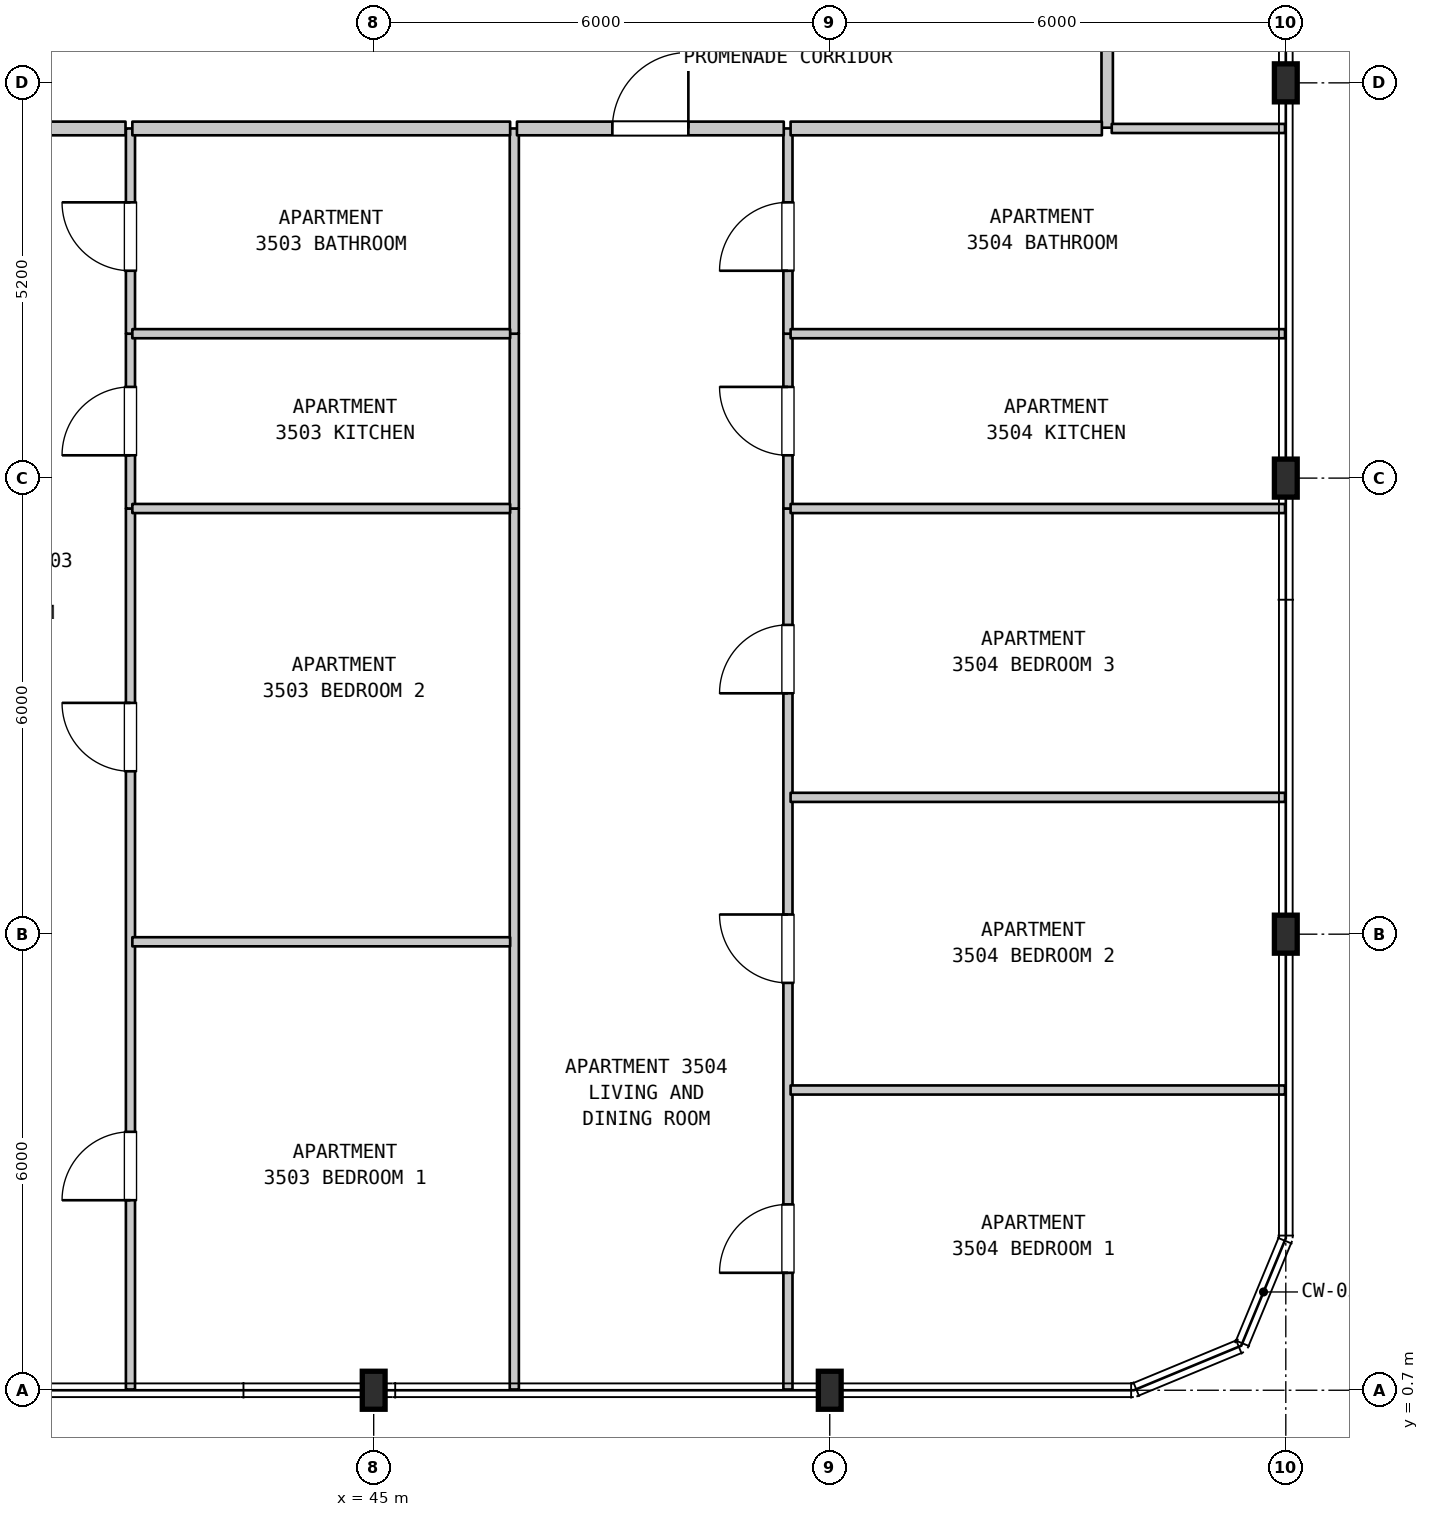
"""IFC4 building model, lengths in metres.
Left out: names, types, materials, properties, quantities, classifications, styles, units other than length and angle.
Written with IfcOpenShell. Run it as: python <this file> out.ifc"""

import sys

from ifc_helpers import new_model, si_unit, direction, frame, frame_2d, origin, origin_2d, place, context, subcontext, project, spatial, rectangle, i_section, extrude, element, fill, save


model = new_model("IFC4")
c1 = context("Model", 3, precision=1e-05, world=origin(), true_north=direction((0.0, 1.0)))
c2 = subcontext(c1, "Body", "Model", "MODEL_VIEW")
j1 = project(units=[si_unit("LENGTHUNIT", "METRE"), si_unit("PLANEANGLEUNIT", "RADIAN")], contexts=[c1])
p1 = place(None, origin())
s1 = spatial("IfcSite", under=j1, at=p1, CompositionType="ELEMENT")
p2 = place(p1, origin())
s2 = spatial("IfcBuilding", under=s1, at=p2, CompositionType="ELEMENT")
p3 = place(p2, frame((0.0, 0.0, 144.6)))
s3 = spatial("IfcBuildingStorey", under=s2, at=p3, CompositionType="ELEMENT", Elevation=144.6)
for number, where, z_axis, x_axis in (
    (1, (45.0, 0.7, 0.0), (0.0, 0.0, 1.0), (1.0, 0.0, 0.0)),
    (2, (51.0, 0.7, 0.0), (0.0, 0.0, 1.0), (1.0, 0.0, 0.0)),
    (3, (57.0, 6.7, 0.0), (0.0, 0.0, 1.0), (1.0, 0.0, 0.0)),
    (4, (57.0, 12.7, 0.0), (0.0, 0.0, 1.0), (1.0, 0.0, 0.0)),
    (5, (57.0, 17.9, 0.0), (0.0, 0.0, 1.0), (1.0, 0.0, 0.0)),
):
    element("IfcColumn", number, at=place(p3, frame(where, z_axis=z_axis, x_axis=x_axis)), inside=s3, PredefinedType="COLUMN", context=c2, shape_type="SweptSolid", body=[
        extrude(i_section(OverallWidth=0.3, OverallDepth=0.5, WebThickness=0.014, FlangeThickness=0.028, FilletRadius=0.027, at=origin_2d()), origin(), (0.0, 0.0, 1.0), 3.7),
    ])
p4 = place(p3, frame((41.8, 0.71, 0.0), z_axis=(0.0, 0.0, 1.0), x_axis=(0.0, 1.0, 0.0)))
e6 = element("IfcWall", 6, at=p4, inside=s3, PredefinedType="PARTITIONING", context=c2, shape_type="SweptSolid", body=[
    extrude(rectangle(XDim=11.59, YDim=0.12, at=frame_2d((5.795, 0.0))), origin(), (0.0, 0.0, 1.0), 3.385),
])
p5 = place(p4, frame((2.49, 0.0, 0.0)))
e7 = element("IfcOpeningElement", 7, at=p5, cuts=e6, PredefinedType="OPENING", context=c2, shape_type="SweptSolid", body=[
    extrude(rectangle(XDim=0.9, YDim=2.15, at=frame_2d((0.45, 1.075))), frame((0.0, 0.07, 0.0), z_axis=(0.0, -1.0, 0.0), x_axis=(1.0, 0.0, 0.0)), (0.0, 0.0, 1.0), 0.14),
])
p6 = place(p4, frame((8.133, 0.0, 0.0)))
e8 = element("IfcOpeningElement", 8, at=p6, cuts=e6, PredefinedType="OPENING", context=c2, shape_type="SweptSolid", body=[
    extrude(rectangle(XDim=0.9, YDim=2.15, at=frame_2d((0.45, 1.075))), frame((0.0, 0.07, 0.0), z_axis=(0.0, -1.0, 0.0), x_axis=(1.0, 0.0, 0.0)), (0.0, 0.0, 1.0), 0.14),
])
p7 = place(p3, frame((41.8, 12.3, 0.0), z_axis=(0.0, 0.0, 1.0), x_axis=(0.0, 1.0, 0.0)))
e9 = element("IfcWall", 9, at=p7, inside=s3, PredefinedType="PARTITIONING", context=c2, shape_type="SweptSolid", body=[
    extrude(rectangle(XDim=2.3, YDim=0.12, at=frame_2d((1.15, 0.0))), origin(), (0.0, 0.0, 1.0), 3.385),
])
p8 = place(p7, frame((0.7, 0.0, 0.0)))
e10 = element("IfcOpeningElement", 10, at=p8, cuts=e9, PredefinedType="OPENING", context=c2, shape_type="SweptSolid", body=[
    extrude(rectangle(XDim=0.9, YDim=2.15, at=frame_2d((0.45, 1.075))), frame((0.0, 0.07, 0.0), z_axis=(0.0, -1.0, 0.0), x_axis=(1.0, 0.0, 0.0)), (0.0, 0.0, 1.0), 0.14),
])
p9 = place(p3, frame((41.8, 14.6, 0.0), z_axis=(0.0, 0.0, 1.0), x_axis=(0.0, 1.0, 0.0)))
e11 = element("IfcWall", 11, at=p9, inside=s3, PredefinedType="PARTITIONING", context=c2, shape_type="SweptSolid", body=[
    extrude(rectangle(XDim=2.7, YDim=0.12, at=frame_2d((1.35, 0.0))), origin(), (0.0, 0.0, 1.0), 3.385),
])
p10 = place(p9, frame((0.828, 0.0, 0.0)))
e12 = element("IfcOpeningElement", 12, at=p10, cuts=e11, PredefinedType="OPENING", context=c2, shape_type="SweptSolid", body=[
    extrude(rectangle(XDim=0.9, YDim=2.1, at=frame_2d((0.45, 1.05))), frame((0.0, 0.07, 0.0), z_axis=(0.0, -1.0, 0.0), x_axis=(1.0, 0.0, 0.0)), (0.0, 0.0, 1.0), 0.14),
])
p11 = place(p3, frame((46.85, 0.71, 0.0), z_axis=(0.0, 0.0, 1.0), x_axis=(0.0, 1.0, 0.0)))
e13 = element("IfcWall", 13, at=p11, inside=s3, PredefinedType="PARTITIONING", context=c2, shape_type="SweptSolid", body=[
    extrude(rectangle(XDim=11.59, YDim=0.12, at=frame_2d((5.795, 0.0))), origin(), (0.0, 0.0, 1.0), 3.385),
])
p12 = place(p3, frame((46.85, 12.3, 0.0), z_axis=(0.0, 0.0, 1.0), x_axis=(0.0, 1.0, 0.0)))
e14 = element("IfcWall", 14, at=p12, inside=s3, PredefinedType="PARTITIONING", context=c2, shape_type="SweptSolid", body=[
    extrude(rectangle(XDim=2.3, YDim=0.12, at=frame_2d((1.15, 0.0))), origin(), (0.0, 0.0, 1.0), 3.385),
])
p13 = place(p3, frame((46.85, 14.6, 0.0), z_axis=(0.0, 0.0, 1.0), x_axis=(0.0, 1.0, 0.0)))
e15 = element("IfcWall", 15, at=p13, inside=s3, PredefinedType="PARTITIONING", context=c2, shape_type="SweptSolid", body=[
    extrude(rectangle(XDim=2.7, YDim=0.12, at=frame_2d((1.35, 0.0))), origin(), (0.0, 0.0, 1.0), 3.385),
])
p14 = place(p3, frame((50.45, 0.71, 0.0), z_axis=(0.0, 0.0, 1.0), x_axis=(0.0, 1.0, 0.0)))
e16 = element("IfcWall", 16, at=p14, inside=s3, PredefinedType="PARTITIONING", context=c2, shape_type="SweptSolid", body=[
    extrude(rectangle(XDim=11.59, YDim=0.12, at=frame_2d((5.795, 0.0))), origin(), (0.0, 0.0, 1.0), 3.385),
])
p15 = place(p14, frame((1.535, 0.0, 0.0)))
e17 = element("IfcOpeningElement", 17, at=p15, cuts=e16, PredefinedType="OPENING", context=c2, shape_type="SweptSolid", body=[
    extrude(rectangle(XDim=0.9, YDim=2.15, at=frame_2d((0.45, 1.075))), frame((0.0, 0.07, 0.0), z_axis=(0.0, -1.0, 0.0), x_axis=(1.0, 0.0, 0.0)), (0.0, 0.0, 1.0), 0.14),
])
p16 = place(p14, frame((5.349, 0.0, 0.0)))
e18 = element("IfcOpeningElement", 18, at=p16, cuts=e16, PredefinedType="OPENING", context=c2, shape_type="SweptSolid", body=[
    extrude(rectangle(XDim=0.9, YDim=2.15, at=frame_2d((0.45, 1.075))), frame((0.0, 0.07, 0.0), z_axis=(0.0, -1.0, 0.0), x_axis=(1.0, 0.0, 0.0)), (0.0, 0.0, 1.0), 0.14),
])
p17 = place(p14, frame((9.159, 0.0, 0.0)))
e19 = element("IfcOpeningElement", 19, at=p17, cuts=e16, PredefinedType="OPENING", context=c2, shape_type="SweptSolid", body=[
    extrude(rectangle(XDim=0.9, YDim=2.15, at=frame_2d((0.45, 1.075))), frame((0.0, 0.07, 0.0), z_axis=(0.0, -1.0, 0.0), x_axis=(1.0, 0.0, 0.0)), (0.0, 0.0, 1.0), 0.14),
])
p18 = place(p3, frame((50.45, 12.3, 0.0), z_axis=(0.0, 0.0, 1.0), x_axis=(0.0, 1.0, 0.0)))
e20 = element("IfcWall", 20, at=p18, inside=s3, PredefinedType="PARTITIONING", context=c2, shape_type="SweptSolid", body=[
    extrude(rectangle(XDim=2.3, YDim=0.12, at=frame_2d((1.15, 0.0))), origin(), (0.0, 0.0, 1.0), 3.385),
])
p19 = place(p18, frame((0.7, 0.0, 0.0)))
e21 = element("IfcOpeningElement", 21, at=p19, cuts=e20, PredefinedType="OPENING", context=c2, shape_type="SweptSolid", body=[
    extrude(rectangle(XDim=0.9, YDim=2.15, at=frame_2d((0.45, 1.075))), frame((0.0, 0.07, 0.0), z_axis=(0.0, -1.0, 0.0), x_axis=(1.0, 0.0, 0.0)), (0.0, 0.0, 1.0), 0.14),
])
p20 = place(p3, frame((50.45, 14.6, 0.0), z_axis=(0.0, 0.0, 1.0), x_axis=(0.0, 1.0, 0.0)))
e22 = element("IfcWall", 22, at=p20, inside=s3, PredefinedType="PARTITIONING", context=c2, shape_type="SweptSolid", body=[
    extrude(rectangle(XDim=2.7, YDim=0.12, at=frame_2d((1.35, 0.0))), origin(), (0.0, 0.0, 1.0), 3.385),
])
p21 = place(p20, frame((0.828, 0.0, 0.0)))
e23 = element("IfcOpeningElement", 23, at=p21, cuts=e22, PredefinedType="OPENING", context=c2, shape_type="SweptSolid", body=[
    extrude(rectangle(XDim=0.9, YDim=2.1, at=frame_2d((0.45, 1.05))), frame((0.0, 0.07, 0.0), z_axis=(0.0, -1.0, 0.0), x_axis=(1.0, 0.0, 0.0)), (0.0, 0.0, 1.0), 0.14),
])
p22 = place(p3, frame((54.65, 17.31, 0.0), z_axis=(0.0, 0.0, 1.0), x_axis=(0.0, 1.0, 0.0)))
e24 = element("IfcWall", 24, at=p22, inside=s3, PredefinedType="STANDARD", context=c2, shape_type="SweptSolid", body=[
    extrude(rectangle(XDim=2.19, YDim=0.15, at=frame_2d((1.095, 0.0))), origin(), (0.0, 0.0, 1.0), 3.385),
])
p23 = place(p3, frame((50.485, 4.65, 0.0), z_axis=(0.0, 0.0, 1.0), x_axis=(1.0, 0.0, 0.0)))
e25 = element("IfcWall", 25, at=p23, inside=s3, PredefinedType="PARTITIONING", context=c2, shape_type="SweptSolid", body=[
    extrude(rectangle(XDim=6.505, YDim=0.12, at=frame_2d((3.252, 0.0))), origin(), (0.0, 0.0, 1.0), 3.385),
])
p24 = place(p3, frame((41.825, 6.6, 0.0), z_axis=(0.0, 0.0, 1.0), x_axis=(1.0, 0.0, 0.0)))
e26 = element("IfcWall", 26, at=p24, inside=s3, PredefinedType="PARTITIONING", context=c2, shape_type="SweptSolid", body=[
    extrude(rectangle(XDim=4.97, YDim=0.12, at=frame_2d((2.485, 0.0))), origin(), (0.0, 0.0, 1.0), 2.785),
])
p25 = place(p3, frame((50.485, 8.5, 0.0), z_axis=(0.0, 0.0, 1.0), x_axis=(1.0, 0.0, 0.0)))
e27 = element("IfcWall", 27, at=p25, inside=s3, PredefinedType="PARTITIONING", context=c2, shape_type="SweptSolid", body=[
    extrude(rectangle(XDim=6.505, YDim=0.12, at=frame_2d((3.252, 0.0))), origin(), (0.0, 0.0, 1.0), 3.385),
])
p26 = place(p3, frame((41.825, 12.3, 0.0), z_axis=(0.0, 0.0, 1.0), x_axis=(1.0, 0.0, 0.0)))
e28 = element("IfcWall", 28, at=p26, inside=s3, PredefinedType="PARTITIONING", context=c2, shape_type="SweptSolid", body=[
    extrude(rectangle(XDim=4.97, YDim=0.12, at=frame_2d((2.485, 0.0))), origin(), (0.0, 0.0, 1.0), 3.385),
])
p27 = place(p3, frame((50.485, 12.3, 0.0), z_axis=(0.0, 0.0, 1.0), x_axis=(1.0, 0.0, 0.0)))
e29 = element("IfcWall", 29, at=p27, inside=s3, PredefinedType="PARTITIONING", context=c2, shape_type="SweptSolid", body=[
    extrude(rectangle(XDim=6.505, YDim=0.12, at=frame_2d((3.252, 0.0))), origin(), (0.0, 0.0, 1.0), 3.385),
])
p28 = place(p3, frame((41.825, 14.6, 0.0), z_axis=(0.0, 0.0, 1.0), x_axis=(1.0, 0.0, 0.0)))
e30 = element("IfcWall", 30, at=p28, inside=s3, PredefinedType="PARTITIONING", context=c2, shape_type="SweptSolid", body=[
    extrude(rectangle(XDim=4.97, YDim=0.12, at=frame_2d((2.485, 0.0))), origin(), (0.0, 0.0, 1.0), 3.385),
])
p29 = place(p3, frame((50.485, 14.6, 0.0), z_axis=(0.0, 0.0, 1.0), x_axis=(1.0, 0.0, 0.0)))
e31 = element("IfcWall", 31, at=p29, inside=s3, PredefinedType="PARTITIONING", context=c2, shape_type="SweptSolid", body=[
    extrude(rectangle(XDim=6.505, YDim=0.12, at=frame_2d((3.252, 0.0))), origin(), (0.0, 0.0, 1.0), 3.385),
])
p30 = place(p3, frame((38.225, 17.3, 0.0), z_axis=(0.0, 0.0, 1.0), x_axis=(1.0, 0.0, 0.0)))
e32 = element("IfcWall", 32, at=p30, inside=s3, PredefinedType="STANDARD", context=c2, shape_type="SweptSolid", body=[
    extrude(rectangle(XDim=3.51, YDim=0.18, at=frame_2d((1.755, 0.0))), origin(), (0.0, 0.0, 1.0), 3.385),
])
p31 = place(p30, frame((1.185, 0.0, 0.0)))
e33 = element("IfcOpeningElement", 33, at=p31, cuts=e32, PredefinedType="OPENING", context=c2, shape_type="SweptSolid", body=[
    extrude(rectangle(XDim=1.0, YDim=2.15, at=frame_2d((0.5, 1.075))), frame((0.0, 0.1, 0.0), z_axis=(0.0, -1.0, 0.0), x_axis=(1.0, 0.0, 0.0)), (0.0, 0.0, 1.0), 0.2),
])
p32 = place(p3, frame((41.825, 17.3, 0.0), z_axis=(0.0, 0.0, 1.0), x_axis=(1.0, 0.0, 0.0)))
e34 = element("IfcWall", 34, at=p32, inside=s3, PredefinedType="STANDARD", context=c2, shape_type="SweptSolid", body=[
    extrude(rectangle(XDim=4.97, YDim=0.18, at=frame_2d((2.485, 0.0))), origin(), (0.0, 0.0, 1.0), 3.385),
])
p33 = place(p3, frame((46.885, 17.3, 0.0), z_axis=(0.0, 0.0, 1.0), x_axis=(1.0, 0.0, 0.0)))
e35 = element("IfcWall", 35, at=p33, inside=s3, PredefinedType="STANDARD", context=c2, shape_type="SweptSolid", body=[
    extrude(rectangle(XDim=3.51, YDim=0.18, at=frame_2d((1.755, 0.0))), origin(), (0.0, 0.0, 1.0), 3.385),
])
p34 = place(p33, frame((1.255, 0.0, 0.0)))
e36 = element("IfcOpeningElement", 36, at=p34, cuts=e35, PredefinedType="OPENING", context=c2, shape_type="SweptSolid", body=[
    extrude(rectangle(XDim=1.0, YDim=2.15, at=frame_2d((0.5, 1.075))), frame((0.0, 0.1, 0.0), z_axis=(0.0, -1.0, 0.0), x_axis=(1.0, 0.0, 0.0)), (0.0, 0.0, 1.0), 0.2),
])
p35 = place(p3, frame((50.485, 17.3, 0.0), z_axis=(0.0, 0.0, 1.0), x_axis=(1.0, 0.0, 0.0)))
e37 = element("IfcWall", 37, at=p35, inside=s3, PredefinedType="STANDARD", context=c2, shape_type="SweptSolid", body=[
    extrude(rectangle(XDim=4.095, YDim=0.18, at=frame_2d((2.047, 0.0))), origin(), (0.0, 0.0, 1.0), 3.385),
])
p36 = place(p3, frame((54.71, 17.3, 0.0), z_axis=(0.0, 0.0, 1.0), x_axis=(1.0, 0.0, 0.0)))
e38 = element("IfcWall", 38, at=p36, inside=s3, PredefinedType="PARTITIONING", context=c2, shape_type="SweptSolid", body=[
    extrude(rectangle(XDim=2.28, YDim=0.12, at=frame_2d((1.14, 0.0))), origin(), (0.0, 0.0, 1.0), 3.385),
])
p37 = place(p5, origin())
e39 = element("IfcDoor", 39, at=p37, inside=s3, OperationType="SINGLE_SWING_LEFT", PredefinedType="DOOR", context=c2, shape_type="SweptSolid", body=[
    extrude(rectangle(XDim=0.9, YDim=2.15, at=frame_2d((0.45, 1.075))), frame((0.0, 0.025, 0.0), z_axis=(0.0, -1.0, 0.0), x_axis=(1.0, 0.0, 0.0)), (0.0, 0.0, 1.0), 0.05),
])
fill(e7, e39)
p38 = place(p6, origin())
e40 = element("IfcDoor", 40, at=p38, inside=s3, OperationType="SINGLE_SWING_RIGHT", PredefinedType="DOOR", context=c2, shape_type="SweptSolid", body=[
    extrude(rectangle(XDim=0.9, YDim=2.15, at=frame_2d((0.45, 1.075))), frame((0.0, 0.025, 0.0), z_axis=(0.0, -1.0, 0.0), x_axis=(1.0, 0.0, 0.0)), (0.0, 0.0, 1.0), 0.05),
])
fill(e8, e40)
p39 = place(p8, origin())
e41 = element("IfcDoor", 41, at=p39, inside=s3, OperationType="SINGLE_SWING_LEFT", PredefinedType="DOOR", context=c2, shape_type="SweptSolid", body=[
    extrude(rectangle(XDim=0.9, YDim=2.15, at=frame_2d((0.45, 1.075))), frame((0.0, 0.025, 0.0), z_axis=(0.0, -1.0, 0.0), x_axis=(1.0, 0.0, 0.0)), (0.0, 0.0, 1.0), 0.05),
])
fill(e10, e41)
p40 = place(p10, origin())
e42 = element("IfcDoor", 42, at=p40, inside=s3, OperationType="SINGLE_SWING_RIGHT", PredefinedType="DOOR", context=c2, shape_type="SweptSolid", body=[
    extrude(rectangle(XDim=0.9, YDim=2.1, at=frame_2d((0.45, 1.05))), frame((0.0, 0.025, 0.0), z_axis=(0.0, -1.0, 0.0), x_axis=(1.0, 0.0, 0.0)), (0.0, 0.0, 1.0), 0.05),
])
fill(e12, e42)
p41 = place(p15, origin())
e43 = element("IfcDoor", 43, at=p41, inside=s3, OperationType="SINGLE_SWING_LEFT", PredefinedType="DOOR", context=c2, shape_type="SweptSolid", body=[
    extrude(rectangle(XDim=0.9, YDim=2.15, at=frame_2d((0.45, 1.075))), frame((0.0, 0.025, 0.0), z_axis=(0.0, -1.0, 0.0), x_axis=(1.0, 0.0, 0.0)), (0.0, 0.0, 1.0), 0.05),
])
fill(e17, e43)
p42 = place(p16, origin())
e44 = element("IfcDoor", 44, at=p42, inside=s3, OperationType="SINGLE_SWING_RIGHT", PredefinedType="DOOR", context=c2, shape_type="SweptSolid", body=[
    extrude(rectangle(XDim=0.9, YDim=2.15, at=frame_2d((0.45, 1.075))), frame((0.0, 0.025, 0.0), z_axis=(0.0, -1.0, 0.0), x_axis=(1.0, 0.0, 0.0)), (0.0, 0.0, 1.0), 0.05),
])
fill(e18, e44)
p43 = place(p17, origin())
e45 = element("IfcDoor", 45, at=p43, inside=s3, OperationType="SINGLE_SWING_LEFT", PredefinedType="DOOR", context=c2, shape_type="SweptSolid", body=[
    extrude(rectangle(XDim=0.9, YDim=2.15, at=frame_2d((0.45, 1.075))), frame((0.0, 0.025, 0.0), z_axis=(0.0, -1.0, 0.0), x_axis=(1.0, 0.0, 0.0)), (0.0, 0.0, 1.0), 0.05),
])
fill(e19, e45)
p44 = place(p19, origin())
e46 = element("IfcDoor", 46, at=p44, inside=s3, OperationType="SINGLE_SWING_RIGHT", PredefinedType="DOOR", context=c2, shape_type="SweptSolid", body=[
    extrude(rectangle(XDim=0.9, YDim=2.15, at=frame_2d((0.45, 1.075))), frame((0.0, 0.025, 0.0), z_axis=(0.0, -1.0, 0.0), x_axis=(1.0, 0.0, 0.0)), (0.0, 0.0, 1.0), 0.05),
])
fill(e21, e46)
p45 = place(p21, origin())
e47 = element("IfcDoor", 47, at=p45, inside=s3, OperationType="SINGLE_SWING_LEFT", PredefinedType="DOOR", context=c2, shape_type="SweptSolid", body=[
    extrude(rectangle(XDim=0.9, YDim=2.1, at=frame_2d((0.45, 1.05))), frame((0.0, 0.025, 0.0), z_axis=(0.0, -1.0, 0.0), x_axis=(1.0, 0.0, 0.0)), (0.0, 0.0, 1.0), 0.05),
])
fill(e23, e47)
p46 = place(p34, origin())
e48 = element("IfcDoor", 48, at=p46, inside=s3, OperationType="SINGLE_SWING_RIGHT", PredefinedType="DOOR", context=c2, shape_type="SweptSolid", body=[
    extrude(rectangle(XDim=1.0, YDim=2.15, at=frame_2d((0.5, 1.075))), frame((0.0, 0.025, 0.0), z_axis=(0.0, -1.0, 0.0), x_axis=(1.0, 0.0, 0.0)), (0.0, 0.0, 1.0), 0.05),
])
fill(e36, e48)
save(model, sys.argv[1])
